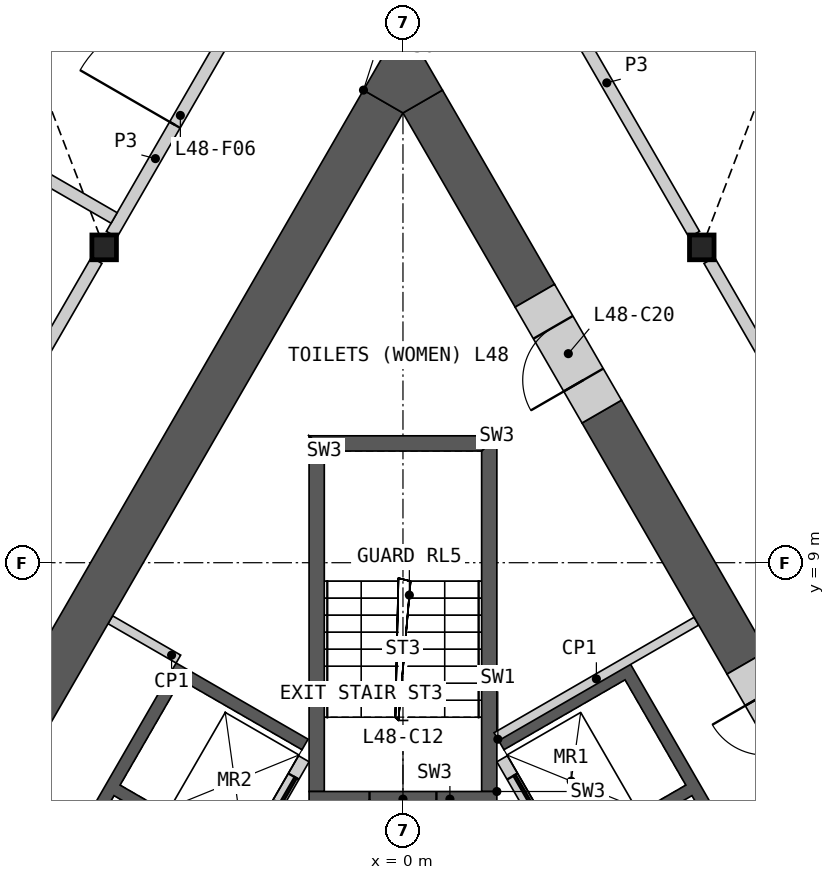
"""IFC4 building model, lengths in metres.
Left out: names, types, materials, properties, quantities, classifications, styles, units other than length and angle.
Written with IfcOpenShell. Run it as: python <this file> out.ifc"""

import sys

from ifc_helpers import new_model, si_unit, direction, frame, frame_2d, origin, origin_2d, place, context, subcontext, project, spatial, polyline, rectangle, i_section, outline, extrude, element, fill, save


model = new_model("IFC4")
c1 = context("Model", 3, precision=1e-05, world=origin(), true_north=direction((0.0, 1.0)))
c2 = subcontext(c1, "Body", "Model", "MODEL_VIEW")
j1 = project(units=[si_unit("LENGTHUNIT", "METRE"), si_unit("PLANEANGLEUNIT", "RADIAN")], contexts=[c1])
p1 = place(None, origin())
s1 = spatial("IfcSite", under=j1, at=p1, CompositionType="ELEMENT")
p2 = place(p1, origin())
s2 = spatial("IfcBuilding", under=s1, at=p2, CompositionType="ELEMENT")
p3 = place(p2, frame((0.0, 0.0, 216.0)))
s3 = spatial("IfcBuildingStorey", under=s2, at=p3, CompositionType="ELEMENT", Elevation=216.0)
for number, where, z_axis, x_axis in (
    (1, (-4.914, 14.186, 0.0), (0.0, 0.0, 1.0), (1.0, 0.0, 0.0)),
    (2, (4.914, 14.186, 0.0), (0.0, 0.0, 1.0), (1.0, 0.0, 0.0)),
):
    element("IfcColumn", number, at=place(p3, frame(where, z_axis=z_axis, x_axis=x_axis)), inside=s3, PredefinedType="COLUMN", context=c2, shape_type="SweptSolid", body=[
        extrude(i_section(OverallWidth=0.404, OverallDepth=0.407, WebThickness=0.027, FlangeThickness=0.044, at=origin_2d()), origin(), (0.0, 0.0, 1.0), 10.0),
    ])
p4 = place(p3, origin())
e3 = element("IfcWall", 3, at=p4, inside=s3, PredefinedType="SHEAR", context=c2, shape_type="SweptSolid", body=[
    extrude(outline(polyline([(1.561, 6.097), (3.731, 7.35), (8.231, -0.444), (6.061, -1.697), (5.96, -1.524), (7.952, -0.374), (4.752, 5.169), (2.76, 4.019), (2.66, 4.192), (4.652, 5.342), (3.652, 7.074), (1.66, 5.924), (1.561, 6.097)])), origin(), (0.0, 0.0, 1.0), 9.65),
])
p5 = place(p3, frame((5.817, -1.476, 0.0), z_axis=(0.0, 0.0, 1.0), x_axis=(-0.500002616675, 0.866023893041, 0.0)))
e4 = element("IfcWall", 4, at=p5, inside=s3, PredefinedType="SOLIDWALL", context=c2, shape_type="SweptSolid", body=[
    extrude(rectangle(XDim=8.373, YDim=0.2, at=frame_2d((4.187, 0.0))), origin(), (0.0, 0.0, 1.0), 9.65),
])
p6 = place(p5, frame((2.637, 0.0, 0.0)))
e5 = element("IfcOpeningElement", 5, at=p6, cuts=e4, PredefinedType="OPENING", context=c2, shape_type="SweptSolid", body=[
    extrude(rectangle(XDim=0.9, YDim=2.1, at=frame_2d((0.45, 1.05))), frame((0.0, 0.11, 0.0), z_axis=(0.0, -1.0, 0.0), x_axis=(1.0, 0.0, 0.0)), (0.0, 0.0, 1.0), 0.22),
])
p7 = place(p5, frame((6.937, 0.0, 0.0)))
e6 = element("IfcOpeningElement", 6, at=p7, cuts=e4, PredefinedType="OPENING", context=c2, shape_type="SweptSolid", body=[
    extrude(rectangle(XDim=1.1, YDim=2.1, at=frame_2d((0.55, 1.05))), frame((0.0, 0.11, 0.0), z_axis=(0.0, -1.0, 0.0), x_axis=(1.0, 0.0, 0.0)), (0.0, 0.0, 1.0), 0.22),
])
p8 = place(p3, origin())
e7 = element("IfcWall", 7, at=p8, inside=s3, PredefinedType="SHEAR", context=c2, shape_type="SweptSolid", body=[
    extrude(outline(polyline([(-4.96, 0.208), (-7.131, 1.461), (-3.731, 7.35), (-1.561, 6.097), (-1.66, 5.924), (-3.652, 7.074), (-4.652, 5.342), (-2.66, 4.192), (-2.76, 4.019), (-4.752, 5.169), (-5.752, 3.437), (-3.76, 2.287), (-3.861, 2.113), (-5.852, 3.263), (-6.852, 1.531), (-4.861, 0.381), (-4.96, 0.208)])), origin(), (0.0, 0.0, 1.0), 9.65),
])
p9 = place(p3, frame((-1.631, 5.776, 0.0), z_axis=(0.0, 0.0, 1.0), x_axis=(-0.499992876559, -0.866029516466, 0.0)))
e8 = element("IfcWall", 8, at=p9, inside=s3, PredefinedType="SOLIDWALL", context=c2, shape_type="SweptSolid", body=[
    extrude(rectangle(XDim=6.486, YDim=0.2, at=frame_2d((3.243, 0.0))), origin(), (0.0, 0.0, 1.0), 9.65),
])
p10 = place(p9, frame((0.337, 0.0, 0.0)))
e9 = element("IfcOpeningElement", 9, at=p10, cuts=e8, PredefinedType="OPENING", context=c2, shape_type="SweptSolid", body=[
    extrude(rectangle(XDim=1.1, YDim=2.1, at=frame_2d((0.55, 1.05))), frame((0.0, 0.11, 0.0), z_axis=(0.0, -1.0, 0.0), x_axis=(1.0, 0.0, 0.0)), (0.0, 0.0, 1.0), 0.22),
])
p11 = place(p9, frame((2.537, 0.0, 0.0)))
e10 = element("IfcOpeningElement", 10, at=p11, cuts=e8, PredefinedType="OPENING", context=c2, shape_type="SweptSolid", body=[
    extrude(rectangle(XDim=1.1, YDim=2.1, at=frame_2d((0.55, 1.05))), frame((0.0, 0.11, 0.0), z_axis=(0.0, -1.0, 0.0), x_axis=(1.0, 0.0, 0.0)), (0.0, 0.0, 1.0), 0.22),
])
p12 = place(p3, origin())
e11 = element("IfcWall", 11, at=p12, inside=s3, PredefinedType="SHEAR", context=c2, shape_type="SweptSolid", body=[
    extrude(outline(polyline([(1.544, 5.237), (1.544, 11.087), (1.294, 10.837), (1.294, 5.237), (1.544, 5.237)])), origin(), (0.0, 0.0, 1.0), 9.65),
])
p13 = place(p3, origin())
e12 = element("IfcWall", 12, at=p13, inside=s3, PredefinedType="SHEAR", context=c2, shape_type="SweptSolid", body=[
    extrude(outline(polyline([(1.544, 11.087), (-1.544, 11.087), (-1.294, 10.837), (1.294, 10.837), (1.544, 11.087)])), origin(), (0.0, 0.0, 1.0), 9.65),
])
p14 = place(p3, origin())
e13 = element("IfcWall", 13, at=p14, inside=s3, PredefinedType="SHEAR", context=c2, shape_type="SweptSolid", body=[
    extrude(outline(polyline([(-1.294, 10.837), (-1.544, 11.087), (-1.544, 5.237), (-1.294, 5.237), (-1.294, 10.837)])), origin(), (0.0, 0.0, 1.0), 9.65),
])
p15 = place(p3, frame((1.544, 5.112, 0.0), z_axis=(0.0, 0.0, 1.0), x_axis=(-1.0, 0.0, 0.0)))
e14 = element("IfcWall", 14, at=p15, inside=s3, PredefinedType="SHEAR", context=c2, shape_type="SweptSolid", body=[
    extrude(rectangle(XDim=3.088, YDim=0.25, at=frame_2d((1.544, 0.0))), origin(), (0.0, 0.0, 1.0), 9.65),
])
p16 = place(p15, frame((0.994, 0.0, 0.0)))
e15 = element("IfcOpeningElement", 15, at=p16, cuts=e14, PredefinedType="OPENING", context=c2, shape_type="SweptSolid", body=[
    extrude(rectangle(XDim=1.1, YDim=2.1, at=frame_2d((0.55, 1.05))), frame((0.0, 0.135, 0.0), z_axis=(0.0, -1.0, 0.0), x_axis=(1.0, 0.0, 0.0)), (0.0, 0.0, 1.0), 0.27),
])
p17 = place(p3, frame((-3.693, 7.415, 0.0), z_axis=(0.0, 0.0, 1.0), x_axis=(-0.866003189247, 0.500038474733, 0.0)))
e16 = element("IfcWall", 16, at=p17, inside=s3, PredefinedType="PARTITIONING", context=c2, shape_type="SweptSolid", body=[
    extrude(rectangle(XDim=1.293, YDim=0.15, at=frame_2d((0.646, 0.0))), origin(), (0.0, 0.0, 1.0), 9.65),
])
p18 = place(p3, frame((4.826, 8.039, 0.0), z_axis=(0.0, 0.0, 1.0), x_axis=(-0.86601654697, -0.500015340139, 0.0)))
e17 = element("IfcWall", 17, at=p18, inside=s3, PredefinedType="PARTITIONING", context=c2, shape_type="SweptSolid", body=[
    extrude(rectangle(XDim=3.8, YDim=0.15, at=frame_2d((1.9, 0.0))), origin(), (0.0, 0.0, 1.0), 9.65),
])
p19 = place(p3, frame((5.654, 7.355, 0.0), z_axis=(0.0, 0.0, 1.0), x_axis=(-0.4999705729, 0.866042392862, 0.0)))
e18 = element("IfcWall", 18, at=p19, inside=s3, PredefinedType="SHEAR", context=c2, shape_type="SweptSolid", body=[
    extrude(rectangle(XDim=4.77, YDim=0.75, at=frame_2d((2.385, 0.0))), origin(), (0.0, 0.0, 1.0), 9.65),
])
p20 = place(p3, frame((2.169, 13.391, 0.0), z_axis=(0.0, 0.0, 1.0), x_axis=(-0.500018451642, 0.866014750462, 0.0)))
e19 = element("IfcWall", 19, at=p20, inside=s3, PredefinedType="SHEAR", context=c2, shape_type="SweptSolid", body=[
    extrude(rectangle(XDim=3.689, YDim=0.75, at=frame_2d((1.844, 0.0))), origin(), (0.0, 0.0, 1.0), 9.65),
])
p21 = place(p3, frame((-0.325, 16.585, 0.0), z_axis=(0.0, 0.0, 1.0), x_axis=(-0.500008939514, -0.866020242492, 0.0)))
e20 = element("IfcWall", 20, at=p21, inside=s3, PredefinedType="SHEAR", context=c2, shape_type="SweptSolid", body=[
    extrude(rectangle(XDim=11.901, YDim=0.75, at=frame_2d((5.951, 0.0))), origin(), (0.0, 0.0, 1.0), 9.65),
])
p22 = place(p3, origin())
e21 = element("IfcWall", 21, at=p22, inside=s3, PredefinedType="SHEAR", context=c2, shape_type="SweptSolid", body=[
    extrude(outline(polyline([(-0.649, 16.773), (0.0, 17.898), (0.649, 16.773), (0.0, 16.398), (-0.649, 16.773)])), origin(), (0.0, 0.0, 1.0), 9.65),
])
p23 = place(p3, frame((6.754, 5.45, 0.0), z_axis=(0.0, 0.0, 1.0), x_axis=(-0.499994660107, 0.866028486751, 0.0)))
e22 = element("IfcWall", 22, at=p23, inside=s3, PredefinedType="SHEAR", context=c2, shape_type="SweptSolid", body=[
    extrude(rectangle(XDim=2.2, YDim=0.75, at=frame_2d((1.1, 0.0))), origin(), (0.0, 0.0, 1.0), 9.65),
])
p24 = place(p23, frame((0.6, 0.0, 0.0)))
e23 = element("IfcOpeningElement", 23, at=p24, cuts=e22, PredefinedType="OPENING", context=c2, shape_type="SweptSolid", body=[
    extrude(rectangle(XDim=1.0, YDim=2.1, at=frame_2d((0.5, 1.05))), frame((0.0, 0.385, 0.0), z_axis=(0.0, -1.0, 0.0), x_axis=(1.0, 0.0, 0.0)), (0.0, 0.0, 1.0), 0.77),
])
p25 = place(p3, frame((3.269, 11.486, 0.0), z_axis=(0.0, 0.0, 1.0), x_axis=(-0.50002983664, 0.866008176907, 0.0)))
e24 = element("IfcWall", 24, at=p25, inside=s3, PredefinedType="SHEAR", context=c2, shape_type="SweptSolid", body=[
    extrude(rectangle(XDim=2.2, YDim=0.75, at=frame_2d((1.1, 0.0))), origin(), (0.0, 0.0, 1.0), 9.65),
])
p26 = place(p25, frame((0.6, 0.0, 0.0)))
e25 = element("IfcOpeningElement", 25, at=p26, cuts=e24, PredefinedType="OPENING", context=c2, shape_type="SweptSolid", body=[
    extrude(rectangle(XDim=1.0, YDim=2.1, at=frame_2d((0.5, 1.05))), frame((0.0, 0.385, 0.0), z_axis=(0.0, -1.0, 0.0), x_axis=(1.0, 0.0, 0.0)), (0.0, 0.0, 1.0), 0.77),
])
p27 = place(p3, frame((5.038, 13.972, 0.0), z_axis=(0.0, 0.0, 1.0), x_axis=(0.50000393355, -0.866023132736, 0.0)))
e26 = element("IfcWall", 26, at=p27, inside=s3, PredefinedType="PARTITIONING", context=c2, shape_type="SweptSolid", body=[
    extrude(rectangle(XDim=9.335, YDim=0.2, at=frame_2d((4.667, 0.0))), origin(), (0.0, 0.0, 1.0), 9.65),
])
p28 = place(p27, frame((3.768, 0.0, 0.0)))
e27 = element("IfcOpeningElement", 27, at=p28, cuts=e26, PredefinedType="OPENING", context=c2, shape_type="SweptSolid", body=[
    extrude(rectangle(XDim=1.8, YDim=2.1, at=frame_2d((0.9, 1.05))), frame((0.0, 0.11, 0.0), z_axis=(0.0, -1.0, 0.0), x_axis=(1.0, 0.0, 0.0)), (0.0, 0.0, 1.0), 0.22),
])
p29 = place(p3, frame((-9.705, 5.888, 0.0), z_axis=(0.0, 0.0, 1.0), x_axis=(0.50000393355, 0.866023132736, 0.0)))
e28 = element("IfcWall", 28, at=p29, inside=s3, PredefinedType="PARTITIONING", context=c2, shape_type="SweptSolid", body=[
    extrude(rectangle(XDim=9.335, YDim=0.2, at=frame_2d((4.667, 0.0))), origin(), (0.0, 0.0, 1.0), 9.65),
])
p30 = place(p29, frame((3.768, 0.0, 0.0)))
e29 = element("IfcOpeningElement", 29, at=p30, cuts=e28, PredefinedType="OPENING", context=c2, shape_type="SweptSolid", body=[
    extrude(rectangle(XDim=1.8, YDim=2.1, at=frame_2d((0.9, 1.05))), frame((0.0, 0.11, 0.0), z_axis=(0.0, -1.0, 0.0), x_axis=(1.0, 0.0, 0.0)), (0.0, 0.0, 1.0), 0.22),
])
p31 = place(p3, frame((-4.791, 14.4, 0.0), z_axis=(0.0, 0.0, 1.0), x_axis=(0.50000762079, 0.866021003874, 0.0)))
e30 = element("IfcWall", 30, at=p31, inside=s3, PredefinedType="PARTITIONING", context=c2, shape_type="SweptSolid", body=[
    extrude(rectangle(XDim=5.756, YDim=0.2, at=frame_2d((2.878, 0.0))), origin(), (0.0, 0.0, 1.0), 9.65),
])
p32 = place(p31, frame((2.08, 0.0, 0.0)))
e31 = element("IfcOpeningElement", 31, at=p32, cuts=e30, PredefinedType="OPENING", context=c2, shape_type="SweptSolid", body=[
    extrude(rectangle(XDim=1.8, YDim=2.1, at=frame_2d((0.9, 1.05))), frame((0.0, 0.11, 0.0), z_axis=(0.0, -1.0, 0.0), x_axis=(1.0, 0.0, 0.0)), (0.0, 0.0, 1.0), 0.22),
])
p33 = place(p3, frame((1.913, 19.385, 0.0), z_axis=(0.0, 0.0, 1.0), x_axis=(0.50000762079, -0.866021003874, 0.0)))
e32 = element("IfcWall", 32, at=p33, inside=s3, PredefinedType="PARTITIONING", context=c2, shape_type="SweptSolid", body=[
    extrude(rectangle(XDim=5.756, YDim=0.2, at=frame_2d((2.878, 0.0))), origin(), (0.0, 0.0, 1.0), 9.65),
])
p34 = place(p3, frame((-10.927, 18.236, 0.0), z_axis=(0.0, 0.0, 1.0), x_axis=(0.866027130588, -0.499997009076, 0.0)))
e33 = element("IfcWall", 33, at=p34, inside=s3, PredefinedType="PARTITIONING", context=c2, shape_type="SweptSolid", body=[
    extrude(rectangle(XDim=7.133, YDim=0.2, at=frame_2d((3.566, 0.0))), origin(), (0.0, 0.0, 1.0), 8.804),
])
p35 = place(p7, origin())
e34 = element("IfcDoor", 34, at=p35, inside=s3, OperationType="SLIDING_TO_LEFT", PredefinedType="DOOR", context=c2, shape_type="SweptSolid", body=[
    extrude(rectangle(XDim=1.1, YDim=2.1, at=frame_2d((0.55, 1.05))), frame((0.0, 0.025, 0.0), z_axis=(0.0, -1.0, 0.0), x_axis=(1.0, 0.0, 0.0)), (0.0, 0.0, 1.0), 0.05),
])
fill(e6, e34)
p36 = place(p10, origin())
e35 = element("IfcDoor", 35, at=p36, inside=s3, OperationType="SLIDING_TO_LEFT", PredefinedType="DOOR", context=c2, shape_type="SweptSolid", body=[
    extrude(rectangle(XDim=1.1, YDim=2.1, at=frame_2d((0.55, 1.05))), frame((0.0, 0.025, 0.0), z_axis=(0.0, -1.0, 0.0), x_axis=(1.0, 0.0, 0.0)), (0.0, 0.0, 1.0), 0.05),
])
fill(e9, e35)
p37 = place(p16, origin())
e36 = element("IfcDoor", 36, at=p37, inside=s3, OperationType="SINGLE_SWING_RIGHT", PredefinedType="DOOR", context=c2, shape_type="SweptSolid", body=[
    extrude(rectangle(XDim=1.1, YDim=2.1, at=frame_2d((0.55, 1.05))), frame((0.0, 0.025, 0.0), z_axis=(0.0, -1.0, 0.0), x_axis=(1.0, 0.0, 0.0)), (0.0, 0.0, 1.0), 0.05),
])
fill(e15, e36)
p38 = place(p26, origin())
e37 = element("IfcDoor", 37, at=p38, inside=s3, OperationType="SINGLE_SWING_LEFT", PredefinedType="DOOR", context=c2, shape_type="SweptSolid", body=[
    extrude(rectangle(XDim=1.0, YDim=2.1, at=frame_2d((0.5, 1.05))), frame((0.0, 0.13, 0.0), z_axis=(0.0, -1.0, 0.0), x_axis=(1.0, 0.0, 0.0)), (0.0, 0.0, 1.0), 0.05),
])
fill(e25, e37)
p39 = place(p32, origin())
e38 = element("IfcDoor", 38, at=p39, inside=s3, OperationType="DOUBLE_DOOR_SINGLE_SWING", PredefinedType="DOOR", context=c2, shape_type="SweptSolid", body=[
    extrude(rectangle(XDim=1.8, YDim=2.1, at=frame_2d((0.9, 1.05))), frame((0.0, 0.025, 0.0), z_axis=(0.0, -1.0, 0.0), x_axis=(1.0, 0.0, 0.0)), (0.0, 0.0, 1.0), 0.05),
])
fill(e31, e38)
save(model, sys.argv[1])
